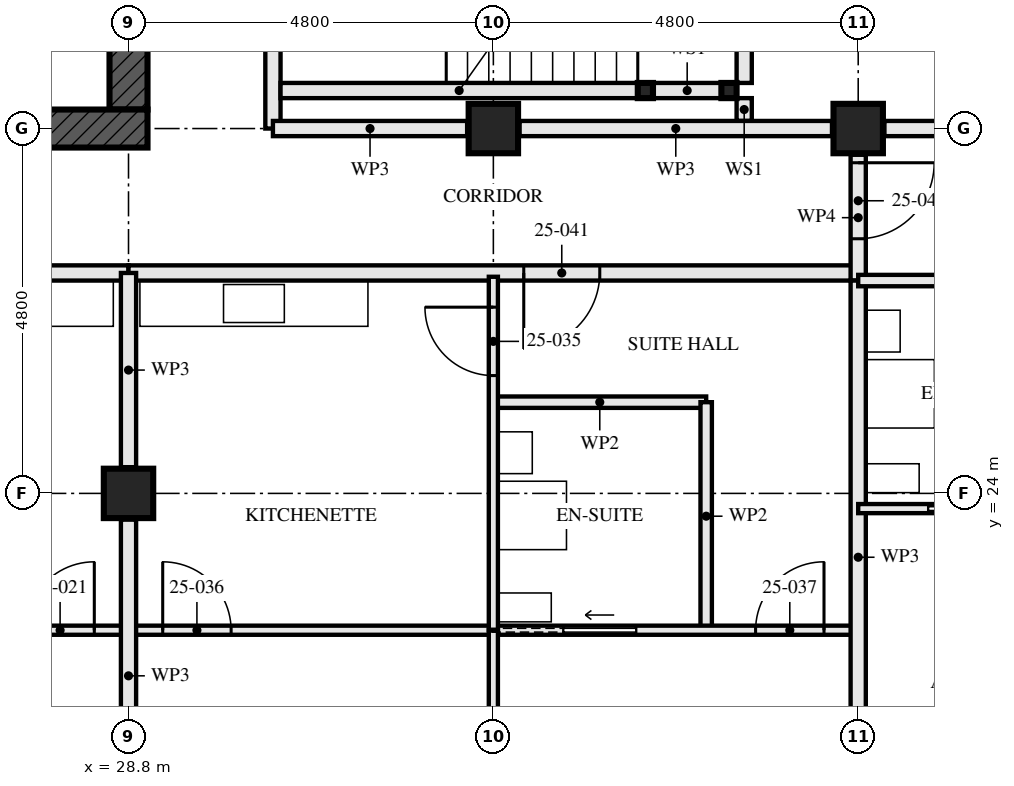
"""IFC4 building model, lengths in metres.
Left out: names, types, materials, properties, quantities, classifications, styles, units other than length and angle.
Written with IfcOpenShell. Run it as: python <this file> out.ifc"""

import sys

from ifc_helpers import new_model, si_unit, direction, frame, frame_2d, origin, origin_2d, place, context, subcontext, project, spatial, rectangle, hollow_rectangle, extrude, element, fill, save


model = new_model("IFC4")
c1 = context("Model", 3, precision=1e-05, world=origin(), true_north=direction((0.0, 1.0)))
c2 = subcontext(c1, "Body", "Model", "MODEL_VIEW")
j1 = project(units=[si_unit("LENGTHUNIT", "METRE"), si_unit("PLANEANGLEUNIT", "RADIAN")], contexts=[c1])
p1 = place(None, origin())
s1 = spatial("IfcSite", under=j1, at=p1, CompositionType="ELEMENT")
p2 = place(p1, origin())
s2 = spatial("IfcBuilding", under=s1, at=p2, CompositionType="ELEMENT")
p3 = place(p2, frame((0.0, 0.0, 94.5)))
s3 = spatial("IfcBuildingStorey", under=s2, at=p3, CompositionType="ELEMENT", Elevation=94.5)
for number, where, z_axis, x_axis in (
    (1, (28.8, 24.0, 0.0), (0.0, 0.0, 1.0), (1.0, 0.0, 0.0)),
    (2, (33.6, 28.8, 0.0), (0.0, 0.0, 1.0), (0.0, 1.0, 0.0)),
    (3, (38.4, 28.8, 0.0), (0.0, 0.0, 1.0), (0.0, 1.0, 0.0)),
):
    element("IfcColumn", number, at=place(p3, frame(where, z_axis=z_axis, x_axis=x_axis)), inside=s3, PredefinedType="COLUMN", context=c2, shape_type="SweptSolid", body=[
        extrude(hollow_rectangle(XDim=0.65, YDim=0.65, WallThickness=0.05, at=origin_2d()), origin(), (0.0, 0.0, 1.0), 3.5),
    ])
p4 = place(p3, frame((14.15, 28.8, -0.17), z_axis=(0.0, 0.0, 1.0), x_axis=(1.0, 0.0, 0.0)))
e4 = element("IfcWall", 4, at=p4, inside=s3, PredefinedType="SHEAR", context=c2, shape_type="SweptSolid", body=[
    extrude(rectangle(XDim=14.9, YDim=0.5, at=frame_2d((7.45, 0.0))), origin(), (0.0, 0.0, 1.0), 3.5),
])
p5 = place(p4, frame((6.85, 0.0, 0.17)))
e5 = element("IfcOpeningElement", 5, at=p5, cuts=e4, PredefinedType="OPENING", context=c2, shape_type="SweptSolid", body=[
    extrude(rectangle(XDim=1.2, YDim=2.1, at=frame_2d((0.6, 1.05))), frame((0.0, 0.26, 0.0), z_axis=(0.0, -1.0, 0.0), x_axis=(1.0, 0.0, 0.0)), (0.0, 0.0, 1.0), 0.521),
])
p6 = place(p3, frame((28.8, 29.05, -0.17), z_axis=(0.0, 0.0, 1.0), x_axis=(0.0, 1.0, 0.0)))
e6 = element("IfcWall", 6, at=p6, inside=s3, PredefinedType="SHEAR", context=c2, shape_type="SweptSolid", body=[
    extrude(rectangle(XDim=13.9, YDim=0.5, at=frame_2d((6.95, 0.0))), origin(), (0.0, 0.0, 1.0), 3.5),
])
p7 = place(p6, frame((6.35, 0.0, 0.17)))
e7 = element("IfcOpeningElement", 7, at=p7, cuts=e6, PredefinedType="OPENING", context=c2, shape_type="SweptSolid", body=[
    extrude(rectangle(XDim=1.2, YDim=2.1, at=frame_2d((0.6, 1.05))), frame((0.0, 0.26, 0.0), z_axis=(0.0, -1.0, 0.0), x_axis=(1.0, 0.0, 0.0)), (0.0, 0.0, 1.0), 0.521),
])
for number, where, z_axis, x_axis in (
    (8, (36.7, 29.3, 0.0), (0.0, 0.0, 1.0), (1.0, 0.0, 0.0)),
    (9, (35.6, 29.3, 0.0), (0.0, 0.0, 1.0), (1.0, 0.0, 0.0)),
):
    element("IfcColumn", number, at=place(p3, frame(where, z_axis=z_axis, x_axis=x_axis)), inside=s3, PredefinedType="COLUMN", context=c2, shape_type="SweptSolid", body=[
        extrude(hollow_rectangle(XDim=0.2, YDim=0.2, WallThickness=0.008, at=origin_2d()), origin(), (0.0, 0.0, 1.0), 3.33),
    ])
p8 = place(p3, frame((24.0, 22.2, 0.0), z_axis=(0.0, 0.0, 1.0), x_axis=(1.0, 0.0, 0.0)))
e10 = element("IfcWall", 10, at=p8, inside=s3, PredefinedType="PARTITIONING", context=c2, shape_type="SweptSolid", body=[
    extrude(rectangle(XDim=4.8, YDim=0.12, at=frame_2d((2.4, 0.0))), origin(), (0.0, 0.0, 1.0), 3.33),
])
p9 = place(p8, frame((3.45, 0.0, 0.0)))
e11 = element("IfcOpeningElement", 11, at=p9, cuts=e10, PredefinedType="OPENING", context=c2, shape_type="SweptSolid", body=[
    extrude(rectangle(XDim=0.9, YDim=2.1, at=frame_2d((0.45, 1.05))), frame((0.0, 0.071, 0.0), z_axis=(0.0, -1.0, 0.0), x_axis=(1.0, 0.0, 0.0)), (0.0, 0.0, 1.0), 0.141),
])
p10 = place(p8, frame((0.925, 0.0, 0.0)))
e12 = element("IfcOpeningElement", 12, at=p10, cuts=e10, PredefinedType="OPENING", context=c2, shape_type="SweptSolid", body=[
    extrude(rectangle(XDim=0.95, YDim=2.1, at=frame_2d((0.475, 1.05))), frame((0.0, 0.071, 0.0), z_axis=(0.0, -1.0, 0.0), x_axis=(1.0, 0.0, 0.0)), (0.0, 0.0, 1.0), 0.141),
])
p11 = place(p3, frame((13.96, 26.9, 0.0), z_axis=(0.0, 0.0, 1.0), x_axis=(1.0, 0.0, 0.0)))
e13 = element("IfcWall", 13, at=p11, inside=s3, PredefinedType="PARTITIONING", context=c2, shape_type="SweptSolid", body=[
    extrude(rectangle(XDim=14.84, YDim=0.2, at=frame_2d((7.42, 0.0))), origin(), (0.0, 0.0, 1.0), 2.32),
])
p12 = place(p11, frame((1.84, 0.0, 0.0)))
e14 = element("IfcOpeningElement", 14, at=p12, cuts=e13, PredefinedType="OPENING", context=c2, shape_type="SweptSolid", body=[
    extrude(rectangle(XDim=1.0, YDim=2.1, at=frame_2d((0.5, 1.05))), frame((0.0, 0.111, 0.0), z_axis=(0.0, -1.0, 0.0), x_axis=(1.0, 0.0, 0.0)), (0.0, 0.0, 1.0), 0.221),
])
p13 = place(p11, frame((3.94, 0.0, 0.0)))
e15 = element("IfcOpeningElement", 15, at=p13, cuts=e13, PredefinedType="OPENING", context=c2, shape_type="SweptSolid", body=[
    extrude(rectangle(XDim=1.0, YDim=2.1, at=frame_2d((0.5, 1.05))), frame((0.0, 0.111, 0.0), z_axis=(0.0, -1.0, 0.0), x_axis=(1.0, 0.0, 0.0)), (0.0, 0.0, 1.0), 0.221),
])
p14 = place(p11, frame((10.44, 0.0, 0.0)))
e16 = element("IfcOpeningElement", 16, at=p14, cuts=e13, PredefinedType="OPENING", context=c2, shape_type="SweptSolid", body=[
    extrude(rectangle(XDim=1.0, YDim=2.1, at=frame_2d((0.5, 1.05))), frame((0.0, 0.111, 0.0), z_axis=(0.0, -1.0, 0.0), x_axis=(1.0, 0.0, 0.0)), (0.0, 0.0, 1.0), 0.221),
])
p15 = place(p3, frame((36.4, 22.2, 0.0), z_axis=(0.0, 0.0, 1.0), x_axis=(0.0, 1.0, 0.0)))
e17 = element("IfcWall", 17, at=p15, inside=s3, PredefinedType="PARTITIONING", context=c2, shape_type="SweptSolid", body=[
    extrude(rectangle(XDim=3.0, YDim=0.15, at=frame_2d((1.5, 0.0))), origin(), (0.0, 0.0, 1.0), 2.55),
])
p16 = place(p3, frame((33.6, 25.2, 0.0), z_axis=(0.0, 0.0, 1.0), x_axis=(1.0, 0.0, 0.0)))
e18 = element("IfcWall", 18, at=p16, inside=s3, PredefinedType="PARTITIONING", context=c2, shape_type="SweptSolid", body=[
    extrude(rectangle(XDim=2.8, YDim=0.15, at=frame_2d((1.4, 0.0))), origin(), (0.0, 0.0, 1.0), 3.33),
])
p17 = place(p3, frame((33.6, 22.2, 0.0), z_axis=(0.0, 0.0, 1.0), x_axis=(0.0, 1.0, 0.0)))
e19 = element("IfcWall", 19, at=p17, inside=s3, PredefinedType="PARTITIONING", context=c2, shape_type="SweptSolid", body=[
    extrude(rectangle(XDim=4.65, YDim=0.12, at=frame_2d((2.325, 0.0))), origin(), (0.0, 0.0, 1.0), 2.55),
])
p18 = place(p17, frame((3.35, 0.0, 0.0)))
e20 = element("IfcOpeningElement", 20, at=p18, cuts=e19, PredefinedType="OPENING", context=c2, shape_type="SweptSolid", body=[
    extrude(rectangle(XDim=0.9, YDim=2.1, at=frame_2d((0.45, 1.05))), frame((0.0, 0.071, 0.0), z_axis=(0.0, -1.0, 0.0), x_axis=(1.0, 0.0, 0.0)), (0.0, 0.0, 1.0), 0.141),
])
p19 = place(p3, frame((28.8, 22.2, 0.0), z_axis=(0.0, 0.0, 1.0), x_axis=(1.0, 0.0, 0.0)))
e21 = element("IfcWall", 21, at=p19, inside=s3, PredefinedType="PARTITIONING", context=c2, shape_type="SweptSolid", body=[
    extrude(rectangle(XDim=4.8, YDim=0.12, at=frame_2d((2.4, 0.0))), origin(), (0.0, 0.0, 1.0), 3.33),
])
p20 = place(p19, frame((0.45, 0.0, 0.0)))
e22 = element("IfcOpeningElement", 22, at=p20, cuts=e21, PredefinedType="OPENING", context=c2, shape_type="SweptSolid", body=[
    extrude(rectangle(XDim=0.9, YDim=2.1, at=frame_2d((0.45, 1.05))), frame((0.0, 0.071, 0.0), z_axis=(0.0, -1.0, 0.0), x_axis=(1.0, 0.0, 0.0)), (0.0, 0.0, 1.0), 0.141),
])
p21 = place(p3, frame((33.6, 22.2, 0.0), z_axis=(0.0, 0.0, 1.0), x_axis=(1.0, 0.0, 0.0)))
e23 = element("IfcWall", 23, at=p21, inside=s3, PredefinedType="PARTITIONING", context=c2, shape_type="SweptSolid", body=[
    extrude(rectangle(XDim=4.8, YDim=0.12, at=frame_2d((2.4, 0.0))), origin(), (0.0, 0.0, 1.0), 3.33),
])
p22 = place(p21, frame((3.45, 0.0, 0.0)))
e24 = element("IfcOpeningElement", 24, at=p22, cuts=e23, PredefinedType="OPENING", context=c2, shape_type="SweptSolid", body=[
    extrude(rectangle(XDim=0.9, YDim=2.1, at=frame_2d((0.45, 1.05))), frame((0.0, 0.071, 0.0), z_axis=(0.0, -1.0, 0.0), x_axis=(1.0, 0.0, 0.0)), (0.0, 0.0, 1.0), 0.141),
])
p23 = place(p21, frame((0.925, 0.0, 0.0)))
e25 = element("IfcOpeningElement", 25, at=p23, cuts=e23, PredefinedType="OPENING", context=c2, shape_type="SweptSolid", body=[
    extrude(rectangle(XDim=0.95, YDim=2.1, at=frame_2d((0.475, 1.05))), frame((0.0, 0.071, 0.0), z_axis=(0.0, -1.0, 0.0), x_axis=(1.0, 0.0, 0.0)), (0.0, 0.0, 1.0), 0.141),
])
p24 = place(p3, frame((33.6, 14.647, 0.0), z_axis=(0.0, 0.0, 1.0), x_axis=(0.0, 1.0, 0.0)))
e26 = element("IfcWall", 26, at=p24, inside=s3, PredefinedType="PARTITIONING", context=c2, shape_type="SweptSolid", body=[
    extrude(rectangle(XDim=7.553, YDim=0.12, at=frame_2d((3.776, 0.0))), origin(), (0.0, 0.0, 1.0), 2.55),
])
p25 = place(p3, frame((38.4, 19.52, 0.0), z_axis=(0.0, 0.0, 1.0), x_axis=(0.0, 1.0, 0.0)))
e27 = element("IfcWall", 27, at=p25, inside=s3, PredefinedType="PARTITIONING", context=c2, shape_type="SweptSolid", body=[
    extrude(rectangle(XDim=7.28, YDim=0.2, at=frame_2d((3.64, 0.0))), origin(), (0.0, 0.0, 1.0), 2.55),
])
p26 = place(p3, frame((38.4, 26.8, 0.0), z_axis=(0.0, 0.0, 1.0), x_axis=(1.0, 0.0, 0.0)))
e28 = element("IfcWall", 28, at=p26, inside=s3, PredefinedType="PARTITIONING", context=c2, shape_type="SweptSolid", body=[
    extrude(rectangle(XDim=2.8, YDim=0.15, at=frame_2d((1.4, 0.0))), origin(), (0.0, 0.0, 1.0), 3.33),
])
p27 = place(p3, frame((38.4, 23.8, 0.0), z_axis=(0.0, 0.0, 1.0), x_axis=(1.0, 0.0, 0.0)))
e29 = element("IfcWall", 29, at=p27, inside=s3, PredefinedType="PARTITIONING", context=c2, shape_type="SweptSolid", body=[
    extrude(rectangle(XDim=4.553, YDim=0.12, at=frame_2d((2.276, 0.0))), origin(), (0.0, 0.0, 1.0), 3.33),
])
p28 = place(p27, frame((2.975, 0.0, 0.0)))
e30 = element("IfcOpeningElement", 30, at=p28, cuts=e29, PredefinedType="OPENING", context=c2, shape_type="SweptSolid", body=[
    extrude(rectangle(XDim=0.9, YDim=2.1, at=frame_2d((0.45, 1.05))), frame((0.0, 0.071, 0.0), z_axis=(0.0, -1.0, 0.0), x_axis=(1.0, 0.0, 0.0)), (0.0, 0.0, 1.0), 0.141),
])
p29 = place(p27, frame((0.925, 0.0, 0.0)))
e31 = element("IfcOpeningElement", 31, at=p29, cuts=e29, PredefinedType="OPENING", context=c2, shape_type="SweptSolid", body=[
    extrude(rectangle(XDim=0.95, YDim=2.1, at=frame_2d((0.475, 1.05))), frame((0.0, 0.071, 0.0), z_axis=(0.0, -1.0, 0.0), x_axis=(1.0, 0.0, 0.0)), (0.0, 0.0, 1.0), 0.141),
])
p30 = place(p3, frame((28.8, 26.9, 0.0), z_axis=(0.0, 0.0, 1.0), x_axis=(1.0, 0.0, 0.0)))
e32 = element("IfcWall", 32, at=p30, inside=s3, PredefinedType="PARTITIONING", context=c2, shape_type="SweptSolid", body=[
    extrude(rectangle(XDim=9.6, YDim=0.2, at=frame_2d((4.8, 0.0))), origin(), (0.0, 0.0, 1.0), 3.33),
])
p31 = place(p30, frame((5.2, 0.0, 0.0)))
e33 = element("IfcOpeningElement", 33, at=p31, cuts=e32, PredefinedType="OPENING", context=c2, shape_type="SweptSolid", body=[
    extrude(rectangle(XDim=1.0, YDim=2.1, at=frame_2d((0.5, 1.05))), frame((0.0, 0.111, 0.0), z_axis=(0.0, -1.0, 0.0), x_axis=(1.0, 0.0, 0.0)), (0.0, 0.0, 1.0), 0.221),
])
p32 = place(p3, frame((38.4, 26.8, 0.0), z_axis=(0.0, 0.0, 1.0), x_axis=(0.0, 1.0, 0.0)))
e34 = element("IfcWall", 34, at=p32, inside=s3, PredefinedType="PARTITIONING", context=c2, shape_type="SweptSolid", body=[
    extrude(rectangle(XDim=1.655, YDim=0.2, at=frame_2d((0.828, 0.0))), origin(), (0.0, 0.0, 1.0), 3.33),
])
p33 = place(p32, frame((0.55, 0.0, 0.0)))
e35 = element("IfcOpeningElement", 35, at=p33, cuts=e34, PredefinedType="OPENING", context=c2, shape_type="SweptSolid", body=[
    extrude(rectangle(XDim=1.0, YDim=2.1, at=frame_2d((0.5, 1.05))), frame((0.0, 0.111, 0.0), z_axis=(0.0, -1.0, 0.0), x_axis=(1.0, 0.0, 0.0)), (0.0, 0.0, 1.0), 0.221),
])
p34 = place(p3, frame((36.6, 29.3, 0.0), z_axis=(0.0, 0.0, 1.0), x_axis=(-1.0, 0.0, 0.0)))
e36 = element("IfcWall", 36, at=p34, inside=s3, PredefinedType="SOLIDWALL", context=c2, shape_type="SweptSolid", body=[
    extrude(rectangle(XDim=0.9, YDim=0.2, at=frame_2d((0.45, 0.0))), origin(), (0.0, 0.0, 1.0), 2.99),
])
p35 = place(p3, frame((35.5, 29.3, 0.0), z_axis=(0.0, 0.0, 1.0), x_axis=(-1.0, 0.0, 0.0)))
e37 = element("IfcWall", 37, at=p35, inside=s3, PredefinedType="SOLIDWALL", context=c2, shape_type="SweptSolid", body=[
    extrude(rectangle(XDim=4.7, YDim=0.2, at=frame_2d((2.35, 0.0))), origin(), (0.0, 0.0, 1.0), 2.99),
])
p36 = place(p3, frame((36.9, 28.9, 0.0), z_axis=(0.0, 0.0, 1.0), x_axis=(0.0, 1.0, 0.0)))
e38 = element("IfcWall", 38, at=p36, inside=s3, PredefinedType="SOLIDWALL", context=c2, shape_type="SweptSolid", body=[
    extrude(rectangle(XDim=0.3, YDim=0.2, at=frame_2d((0.15, 0.0))), origin(), (0.0, 0.0, 1.0), 3.33),
])
p37 = place(p3, frame((36.9, 29.4, 0.0), z_axis=(0.0, 0.0, 1.0), x_axis=(0.0, 1.0, 0.0)))
e39 = element("IfcWall", 39, at=p37, inside=s3, PredefinedType="SOLIDWALL", context=c2, shape_type="SweptSolid", body=[
    extrude(rectangle(XDim=2.6, YDim=0.2, at=frame_2d((1.3, 0.0))), origin(), (0.0, 0.0, 1.0), 3.33),
])
p38 = place(p3, frame((30.7, 28.8, 0.0), z_axis=(0.0, 0.0, 1.0), x_axis=(0.0, 1.0, 0.0)))
e40 = element("IfcWall", 40, at=p38, inside=s3, PredefinedType="PARTITIONING", context=c2, shape_type="SweptSolid", body=[
    extrude(rectangle(XDim=14.84, YDim=0.2, at=frame_2d((7.42, 0.0))), origin(), (0.0, 0.0, 1.0), 2.32),
])
p39 = place(p38, frame((1.4, 0.0, 0.0)))
e41 = element("IfcOpeningElement", 41, at=p39, cuts=e40, PredefinedType="OPENING", context=c2, shape_type="SweptSolid", body=[
    extrude(rectangle(XDim=1.0, YDim=2.1, at=frame_2d((0.5, 1.05))), frame((0.0, 0.111, 0.0), z_axis=(0.0, -1.0, 0.0), x_axis=(1.0, 0.0, 0.0)), (0.0, 0.0, 1.0), 0.221),
])
p40 = place(p38, frame((4.1, 0.0, 0.0)))
e42 = element("IfcOpeningElement", 42, at=p40, cuts=e40, PredefinedType="OPENING", context=c2, shape_type="SweptSolid", body=[
    extrude(rectangle(XDim=1.0, YDim=2.1, at=frame_2d((0.5, 1.05))), frame((0.0, 0.111, 0.0), z_axis=(0.0, -1.0, 0.0), x_axis=(1.0, 0.0, 0.0)), (0.0, 0.0, 1.0), 0.221),
])
p41 = place(p38, frame((5.975, 0.0, 0.0)))
e43 = element("IfcOpeningElement", 43, at=p41, cuts=e40, PredefinedType="OPENING", context=c2, shape_type="SweptSolid", body=[
    extrude(rectangle(XDim=1.0, YDim=2.1, at=frame_2d((0.5, 1.05))), frame((0.0, 0.111, 0.0), z_axis=(0.0, -1.0, 0.0), x_axis=(1.0, 0.0, 0.0)), (0.0, 0.0, 1.0), 0.221),
])
p42 = place(p38, frame((13.0, 0.0, 0.0)))
e44 = element("IfcOpeningElement", 44, at=p42, cuts=e40, PredefinedType="OPENING", context=c2, shape_type="SweptSolid", body=[
    extrude(rectangle(XDim=1.0, YDim=2.1, at=frame_2d((0.5, 1.05))), frame((0.0, 0.111, 0.0), z_axis=(0.0, -1.0, 0.0), x_axis=(1.0, 0.0, 0.0)), (0.0, 0.0, 1.0), 0.221),
])
p43 = place(p3, frame((28.8, 19.545, 0.0), z_axis=(0.0, 0.0, 1.0), x_axis=(0.0, 1.0, 0.0)))
e45 = element("IfcWall", 45, at=p43, inside=s3, PredefinedType="PARTITIONING", context=c2, shape_type="SweptSolid", body=[
    extrude(rectangle(XDim=4.11, YDim=0.2, at=frame_2d((2.055, 0.0))), origin(), (0.0, 0.0, 1.0), 2.32),
])
p44 = place(p3, frame((28.8, 24.345, 0.0), z_axis=(0.0, 0.0, 1.0), x_axis=(0.0, 1.0, 0.0)))
e46 = element("IfcWall", 46, at=p44, inside=s3, PredefinedType="PARTITIONING", context=c2, shape_type="SweptSolid", body=[
    extrude(rectangle(XDim=2.555, YDim=0.2, at=frame_2d((1.277, 0.0))), origin(), (0.0, 0.0, 1.0), 2.32),
])
p45 = place(p3, frame((42.896, 28.8, 0.0), z_axis=(0.0, 0.0, 1.0), x_axis=(-1.0, 0.0, 0.0)))
e47 = element("IfcWall", 47, at=p45, inside=s3, PredefinedType="PARTITIONING", context=c2, shape_type="SweptSolid", body=[
    extrude(rectangle(XDim=4.15, YDim=0.2, at=frame_2d((2.075, 0.0))), origin(), (0.0, 0.0, 1.0), 2.32),
])
p46 = place(p3, frame((38.055, 28.8, 0.0), z_axis=(0.0, 0.0, 1.0), x_axis=(-1.0, 0.0, 0.0)))
e48 = element("IfcWall", 48, at=p46, inside=s3, PredefinedType="PARTITIONING", context=c2, shape_type="SweptSolid", body=[
    extrude(rectangle(XDim=4.11, YDim=0.2, at=frame_2d((2.055, 0.0))), origin(), (0.0, 0.0, 1.0), 2.32),
])
p47 = place(p3, frame((33.255, 28.8, 0.0), z_axis=(0.0, 0.0, 1.0), x_axis=(-1.0, 0.0, 0.0)))
e49 = element("IfcWall", 49, at=p47, inside=s3, PredefinedType="PARTITIONING", context=c2, shape_type="SweptSolid", body=[
    extrude(rectangle(XDim=2.555, YDim=0.2, at=frame_2d((1.277, 0.0))), origin(), (0.0, 0.0, 1.0), 2.32),
])
p48 = place(p9, origin())
e50 = element("IfcDoor", 50, at=p48, inside=s3, OperationType="SINGLE_SWING_LEFT", PredefinedType="DOOR", context=c2, shape_type="SweptSolid", body=[
    extrude(rectangle(XDim=0.9, YDim=2.1, at=frame_2d((0.45, 1.05))), frame((0.0, 0.022, 0.0), z_axis=(0.0, -1.0, 0.0), x_axis=(1.0, 0.0, 0.0)), (0.0, 0.0, 1.0), 0.044),
])
fill(e11, e50)
p49 = place(p18, origin())
e51 = element("IfcDoor", 51, at=p49, inside=s3, OperationType="SINGLE_SWING_LEFT", PredefinedType="DOOR", context=c2, shape_type="SweptSolid", body=[
    extrude(rectangle(XDim=0.9, YDim=2.1, at=frame_2d((0.45, 1.05))), frame((0.0, 0.022, 0.0), z_axis=(0.0, -1.0, 0.0), x_axis=(1.0, 0.0, 0.0)), (0.0, 0.0, 1.0), 0.044),
])
fill(e20, e51)
p50 = place(p20, origin())
e52 = element("IfcDoor", 52, at=p50, inside=s3, OperationType="SINGLE_SWING_RIGHT", PredefinedType="DOOR", context=c2, shape_type="SweptSolid", body=[
    extrude(rectangle(XDim=0.9, YDim=2.1, at=frame_2d((0.45, 1.05))), frame((0.0, 0.022, 0.0), z_axis=(0.0, -1.0, 0.0), x_axis=(1.0, 0.0, 0.0)), (0.0, 0.0, 1.0), 0.044),
])
fill(e22, e52)
p51 = place(p22, origin())
e53 = element("IfcDoor", 53, at=p51, inside=s3, OperationType="SINGLE_SWING_LEFT", PredefinedType="DOOR", context=c2, shape_type="SweptSolid", body=[
    extrude(rectangle(XDim=0.9, YDim=2.1, at=frame_2d((0.45, 1.05))), frame((0.0, 0.022, 0.0), z_axis=(0.0, -1.0, 0.0), x_axis=(1.0, 0.0, 0.0)), (0.0, 0.0, 1.0), 0.044),
])
fill(e24, e53)
p52 = place(p23, origin())
e54 = element("IfcDoor", 54, at=p52, inside=s3, OperationType="SLIDING_TO_RIGHT", PredefinedType="DOOR", context=c2, shape_type="SweptSolid", body=[
    extrude(rectangle(XDim=0.95, YDim=2.1, at=frame_2d((0.475, 1.05))), frame((0.0, 0.022, 0.0), z_axis=(0.0, -1.0, 0.0), x_axis=(1.0, 0.0, 0.0)), (0.0, 0.0, 1.0), 0.044),
])
fill(e25, e54)
p53 = place(p29, origin())
e55 = element("IfcDoor", 55, at=p53, inside=s3, OperationType="SLIDING_TO_LEFT", PredefinedType="DOOR", context=c2, shape_type="SweptSolid", body=[
    extrude(rectangle(XDim=0.95, YDim=2.1, at=frame_2d((0.475, 1.05))), frame((0.0, 0.022, 0.0), z_axis=(0.0, -1.0, 0.0), x_axis=(1.0, 0.0, 0.0)), (0.0, 0.0, 1.0), 0.044),
])
fill(e31, e55)
p54 = place(p31, frame((1.0, 0.0, 0.0), z_axis=(0.0, 0.0, 1.0), x_axis=(-1.0, 0.0, 0.0)))
e56 = element("IfcDoor", 56, at=p54, inside=s3, OperationType="SINGLE_SWING_LEFT", PredefinedType="DOOR", context=c2, shape_type="SweptSolid", body=[
    extrude(rectangle(XDim=1.0, YDim=2.1, at=frame_2d((0.5, 1.05))), frame((0.0, 0.027, 0.0), z_axis=(0.0, -1.0, 0.0), x_axis=(1.0, 0.0, 0.0)), (0.0, 0.0, 1.0), 0.054),
])
fill(e33, e56)
p55 = place(p33, frame((1.0, 0.0, 0.0), z_axis=(0.0, 0.0, 1.0), x_axis=(-1.0, 0.0, 0.0)))
e57 = element("IfcDoor", 57, at=p55, inside=s3, OperationType="SINGLE_SWING_RIGHT", PredefinedType="DOOR", context=c2, shape_type="SweptSolid", body=[
    extrude(rectangle(XDim=1.0, YDim=2.1, at=frame_2d((0.5, 1.05))), frame((0.0, 0.027, 0.0), z_axis=(0.0, -1.0, 0.0), x_axis=(1.0, 0.0, 0.0)), (0.0, 0.0, 1.0), 0.054),
])
fill(e35, e57)
save(model, sys.argv[1])
